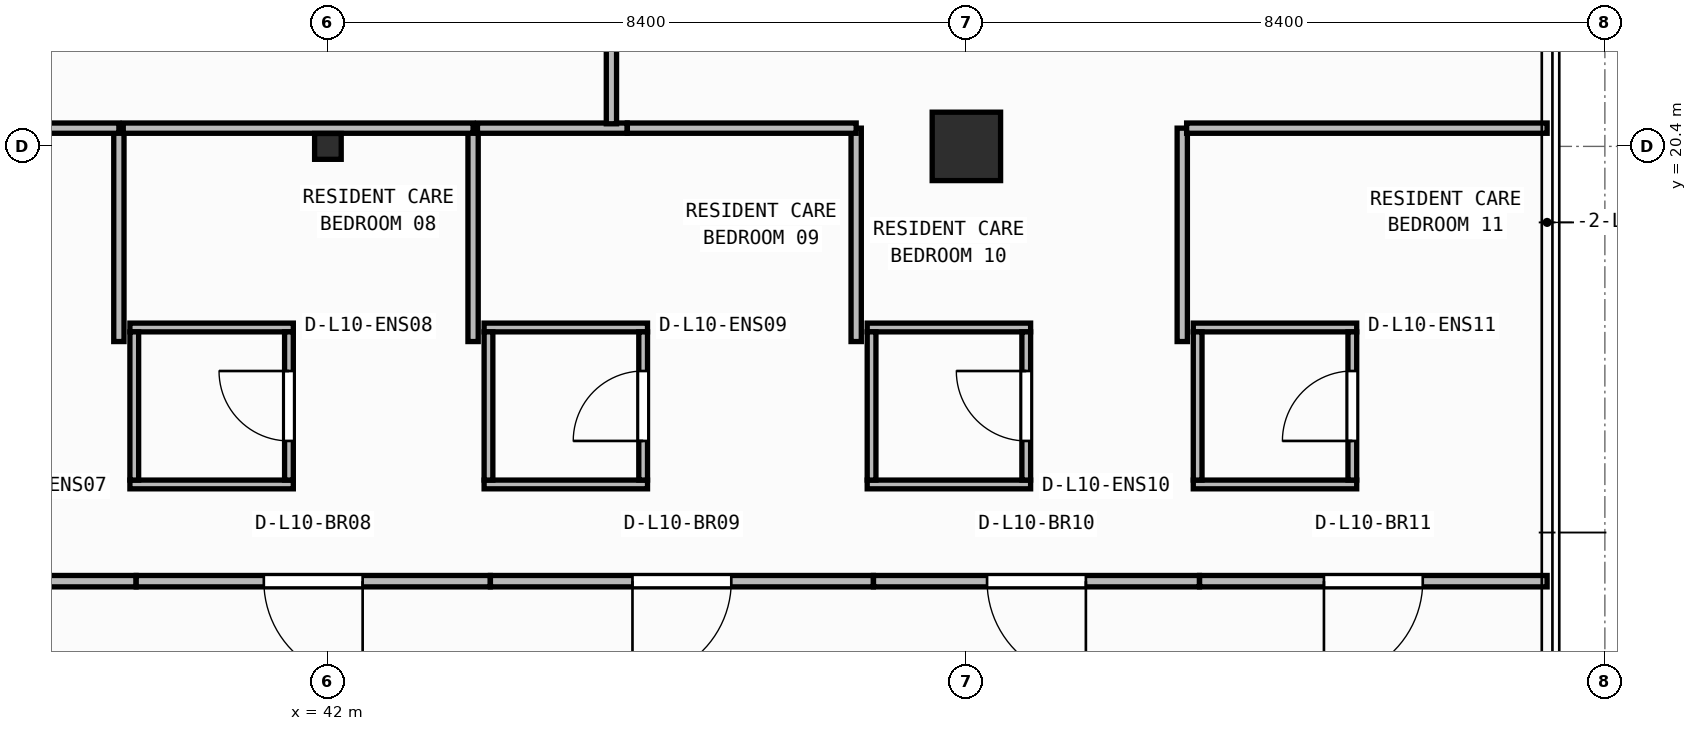
"""IFC4 building model, lengths in metres.
Left out: names, types, materials, properties, quantities, classifications, styles, units other than length and angle.
Written with IfcOpenShell. Run it as: python <this file> out.ifc"""

import sys

from ifc_helpers import new_model, si_unit, direction, frame, frame_2d, origin, origin_2d, place, context, subcontext, project, spatial, rectangle, i_section, extrude, element, fill, save


model = new_model("IFC4")
c1 = context("Model", 3, precision=1e-05, world=origin(), true_north=direction((0.0, 1.0)))
c2 = subcontext(c1, "Body", "Model", "MODEL_VIEW")
j1 = project(units=[si_unit("LENGTHUNIT", "METRE"), si_unit("PLANEANGLEUNIT", "RADIAN")], contexts=[c1])
p1 = place(None, origin())
s1 = spatial("IfcSite", under=j1, at=p1, CompositionType="ELEMENT")
p2 = place(p1, origin())
s2 = spatial("IfcBuilding", under=s1, at=p2, CompositionType="ELEMENT")
p3 = place(p2, frame((0.0, 0.0, 42.25)))
s3 = spatial("IfcBuildingStorey", under=s2, at=p3, CompositionType="ELEMENT", Elevation=42.25)
p4 = place(p3, frame((42.0, 20.4, 0.0), z_axis=(0.0, 0.0, 1.0), x_axis=(1.0, 0.0, 0.0)))
e1 = element("IfcColumn", 1, at=p4, inside=s3, PredefinedType="COLUMN", context=c2, shape_type="SweptSolid", body=[
    extrude(i_section(OverallWidth=0.35, OverallDepth=0.34, WebThickness=0.016, FlangeThickness=0.028, at=origin_2d()), origin(), (0.0, 0.0, 1.0), 3.95),
])
p5 = place(p3, frame((50.4, 20.4, 0.0), z_axis=(0.0, 0.0, 1.0), x_axis=(1.0, 0.0, 0.0)))
e2 = element("IfcColumn", 2, at=p5, inside=s3, PredefinedType="COLUMN", context=c2, shape_type="SweptSolid", body=[
    extrude(rectangle(XDim=0.9, YDim=0.9, at=origin_2d()), origin(), (0.0, 0.0, 1.0), 3.95),
])
p6 = place(p3, frame((39.395, 15.952, 0.0), z_axis=(0.0, 0.0, 1.0), x_axis=(1.0, 0.0, 0.0)))
e3 = element("IfcWall", 3, at=p6, inside=s3, PredefinedType="PARTITIONING", context=c2, shape_type="SweptSolid", body=[
    extrude(rectangle(XDim=2.15, YDim=0.115, at=frame_2d((1.075, 0.0))), origin(), (0.0, 0.0, 1.0), 3.381),
])
p7 = place(p3, frame((39.395, 18.018, 0.0), z_axis=(0.0, 0.0, 1.0), x_axis=(1.0, 0.0, 0.0)))
e4 = element("IfcWall", 4, at=p7, inside=s3, PredefinedType="PARTITIONING", context=c2, shape_type="SweptSolid", body=[
    extrude(rectangle(XDim=2.15, YDim=0.115, at=frame_2d((1.075, 0.0))), origin(), (0.0, 0.0, 1.0), 3.71),
])
p8 = place(p3, frame((39.452, 16.01, 0.0), z_axis=(0.0, 0.0, 1.0), x_axis=(0.0, 1.0, 0.0)))
e5 = element("IfcWall", 5, at=p8, inside=s3, PredefinedType="PARTITIONING", context=c2, shape_type="SweptSolid", body=[
    extrude(rectangle(XDim=1.95, YDim=0.115, at=frame_2d((0.975, 0.0))), origin(), (0.0, 0.0, 1.0), 3.71),
])
p9 = place(p3, frame((41.488, 16.01, 0.0), z_axis=(0.0, 0.0, 1.0), x_axis=(0.0, 1.0, 0.0)))
e6 = element("IfcWall", 6, at=p9, inside=s3, PredefinedType="PARTITIONING", context=c2, shape_type="SweptSolid", body=[
    extrude(rectangle(XDim=1.95, YDim=0.115, at=frame_2d((0.975, 0.0))), origin(), (0.0, 0.0, 1.0), 3.71),
])
p10 = place(p9, frame((0.515, 0.0, 0.0)))
e7 = element("IfcOpeningElement", 7, at=p10, cuts=e6, PredefinedType="OPENING", context=c2, shape_type="SweptSolid", body=[
    extrude(rectangle(XDim=0.92, YDim=2.1, at=frame_2d((0.46, 1.05))), frame((0.0, 0.067, 0.0), z_axis=(0.0, -1.0, 0.0), x_axis=(1.0, 0.0, 0.0)), (0.0, 0.0, 1.0), 0.135),
])
p11 = place(p3, frame((44.055, 15.952, 0.0), z_axis=(0.0, 0.0, 1.0), x_axis=(1.0, 0.0, 0.0)))
e8 = element("IfcWall", 8, at=p11, inside=s3, PredefinedType="PARTITIONING", context=c2, shape_type="SweptSolid", body=[
    extrude(rectangle(XDim=2.15, YDim=0.115, at=frame_2d((1.075, 0.0))), origin(), (0.0, 0.0, 1.0), 3.381),
])
p12 = place(p3, frame((44.055, 18.018, 0.0), z_axis=(0.0, 0.0, 1.0), x_axis=(1.0, 0.0, 0.0)))
e9 = element("IfcWall", 9, at=p12, inside=s3, PredefinedType="PARTITIONING", context=c2, shape_type="SweptSolid", body=[
    extrude(rectangle(XDim=2.15, YDim=0.115, at=frame_2d((1.075, 0.0))), origin(), (0.0, 0.0, 1.0), 3.71),
])
p13 = place(p3, frame((44.113, 16.01, 0.0), z_axis=(0.0, 0.0, 1.0), x_axis=(0.0, 1.0, 0.0)))
e10 = element("IfcWall", 10, at=p13, inside=s3, PredefinedType="PARTITIONING", context=c2, shape_type="SweptSolid", body=[
    extrude(rectangle(XDim=1.95, YDim=0.115, at=frame_2d((0.975, 0.0))), origin(), (0.0, 0.0, 1.0), 3.71),
])
p14 = place(p3, frame((46.147, 16.01, 0.0), z_axis=(0.0, 0.0, 1.0), x_axis=(0.0, 1.0, 0.0)))
e11 = element("IfcWall", 11, at=p14, inside=s3, PredefinedType="PARTITIONING", context=c2, shape_type="SweptSolid", body=[
    extrude(rectangle(XDim=1.95, YDim=0.115, at=frame_2d((0.975, 0.0))), origin(), (0.0, 0.0, 1.0), 3.71),
])
p15 = place(p14, frame((0.515, 0.0, 0.0)))
e12 = element("IfcOpeningElement", 12, at=p15, cuts=e11, PredefinedType="OPENING", context=c2, shape_type="SweptSolid", body=[
    extrude(rectangle(XDim=0.92, YDim=2.1, at=frame_2d((0.46, 1.05))), frame((0.0, 0.067, 0.0), z_axis=(0.0, -1.0, 0.0), x_axis=(1.0, 0.0, 0.0)), (0.0, 0.0, 1.0), 0.135),
])
p16 = place(p3, frame((49.095, 15.952, 0.0), z_axis=(0.0, 0.0, 1.0), x_axis=(1.0, 0.0, 0.0)))
e13 = element("IfcWall", 13, at=p16, inside=s3, PredefinedType="PARTITIONING", context=c2, shape_type="SweptSolid", body=[
    extrude(rectangle(XDim=2.15, YDim=0.115, at=frame_2d((1.075, 0.0))), origin(), (0.0, 0.0, 1.0), 3.381),
])
p17 = place(p3, frame((49.095, 18.018, 0.0), z_axis=(0.0, 0.0, 1.0), x_axis=(1.0, 0.0, 0.0)))
e14 = element("IfcWall", 14, at=p17, inside=s3, PredefinedType="PARTITIONING", context=c2, shape_type="SweptSolid", body=[
    extrude(rectangle(XDim=2.15, YDim=0.115, at=frame_2d((1.075, 0.0))), origin(), (0.0, 0.0, 1.0), 3.71),
])
p18 = place(p3, frame((49.153, 16.01, 0.0), z_axis=(0.0, 0.0, 1.0), x_axis=(0.0, 1.0, 0.0)))
e15 = element("IfcWall", 15, at=p18, inside=s3, PredefinedType="PARTITIONING", context=c2, shape_type="SweptSolid", body=[
    extrude(rectangle(XDim=1.95, YDim=0.115, at=frame_2d((0.975, 0.0))), origin(), (0.0, 0.0, 1.0), 3.71),
])
p19 = place(p3, frame((51.188, 16.01, 0.0), z_axis=(0.0, 0.0, 1.0), x_axis=(0.0, 1.0, 0.0)))
e16 = element("IfcWall", 16, at=p19, inside=s3, PredefinedType="PARTITIONING", context=c2, shape_type="SweptSolid", body=[
    extrude(rectangle(XDim=1.95, YDim=0.115, at=frame_2d((0.975, 0.0))), origin(), (0.0, 0.0, 1.0), 3.71),
])
p20 = place(p19, frame((0.515, 0.0, 0.0)))
e17 = element("IfcOpeningElement", 17, at=p20, cuts=e16, PredefinedType="OPENING", context=c2, shape_type="SweptSolid", body=[
    extrude(rectangle(XDim=0.92, YDim=2.1, at=frame_2d((0.46, 1.05))), frame((0.0, 0.067, 0.0), z_axis=(0.0, -1.0, 0.0), x_axis=(1.0, 0.0, 0.0)), (0.0, 0.0, 1.0), 0.135),
])
for number, where, z_axis, x_axis in (
    (18, (53.385, 15.952, 0.0), (0.0, 0.0, 1.0), (1.0, 0.0, 0.0)),
    (19, (53.385, 18.018, 0.0), (0.0, 0.0, 1.0), (1.0, 0.0, 0.0)),
):
    element("IfcWall", number, at=place(p3, frame(where, z_axis=z_axis, x_axis=x_axis)), inside=s3, PredefinedType="PARTITIONING", context=c2, shape_type="SweptSolid", body=[
        extrude(rectangle(XDim=2.15, YDim=0.115, at=frame_2d((1.075, 0.0))), origin(), (0.0, 0.0, 1.0), 3.71),
    ])
p21 = place(p3, frame((53.442, 16.01, 0.0), z_axis=(0.0, 0.0, 1.0), x_axis=(0.0, 1.0, 0.0)))
e20 = element("IfcWall", 20, at=p21, inside=s3, PredefinedType="PARTITIONING", context=c2, shape_type="SweptSolid", body=[
    extrude(rectangle(XDim=1.95, YDim=0.115, at=frame_2d((0.975, 0.0))), origin(), (0.0, 0.0, 1.0), 3.71),
])
p22 = place(p3, frame((55.478, 16.01, 0.0), z_axis=(0.0, 0.0, 1.0), x_axis=(0.0, 1.0, 0.0)))
e21 = element("IfcWall", 21, at=p22, inside=s3, PredefinedType="PARTITIONING", context=c2, shape_type="SweptSolid", body=[
    extrude(rectangle(XDim=1.95, YDim=0.115, at=frame_2d((0.975, 0.0))), origin(), (0.0, 0.0, 1.0), 3.71),
])
p23 = place(p22, frame((0.515, 0.0, 0.0)))
e22 = element("IfcOpeningElement", 22, at=p23, cuts=e21, PredefinedType="OPENING", context=c2, shape_type="SweptSolid", body=[
    extrude(rectangle(XDim=0.92, YDim=2.1, at=frame_2d((0.46, 1.05))), frame((0.0, 0.067, 0.0), z_axis=(0.0, -1.0, 0.0), x_axis=(1.0, 0.0, 0.0)), (0.0, 0.0, 1.0), 0.135),
])
p24 = place(p3, frame((39.476, 14.68, 0.0), z_axis=(0.0, 0.0, 1.0), x_axis=(-1.0, 0.0, 0.0)))
e23 = element("IfcWall", 23, at=p24, inside=s3, PredefinedType="PARTITIONING", context=c2, shape_type="SweptSolid", body=[
    extrude(rectangle(XDim=4.288, YDim=0.15, at=frame_2d((2.144, 0.0))), origin(), (0.0, 0.0, 1.0), 3.71),
])
p25 = place(p24, frame((1.494, 0.0, 0.0)))
e24 = element("IfcOpeningElement", 24, at=p25, cuts=e23, PredefinedType="OPENING", context=c2, shape_type="SweptSolid", body=[
    extrude(rectangle(XDim=1.3, YDim=2.15, at=frame_2d((0.65, 1.075))), frame((0.0, 0.085, 0.0), z_axis=(0.0, -1.0, 0.0), x_axis=(1.0, 0.0, 0.0)), (0.0, 0.0, 1.0), 0.17),
])
p26 = place(p3, frame((44.136, 14.68, 0.0), z_axis=(0.0, 0.0, 1.0), x_axis=(-1.0, 0.0, 0.0)))
e25 = element("IfcWall", 25, at=p26, inside=s3, PredefinedType="PARTITIONING", context=c2, shape_type="SweptSolid", body=[
    extrude(rectangle(XDim=4.658, YDim=0.15, at=frame_2d((2.329, 0.0))), origin(), (0.0, 0.0, 1.0), 3.71),
])
p27 = place(p26, frame((1.679, 0.0, 0.0)))
e26 = element("IfcOpeningElement", 26, at=p27, cuts=e25, PredefinedType="OPENING", context=c2, shape_type="SweptSolid", body=[
    extrude(rectangle(XDim=1.3, YDim=2.15, at=frame_2d((0.65, 1.075))), frame((0.0, 0.085, 0.0), z_axis=(0.0, -1.0, 0.0), x_axis=(1.0, 0.0, 0.0)), (0.0, 0.0, 1.0), 0.17),
])
p28 = place(p3, frame((49.176, 14.68, 0.0), z_axis=(0.0, 0.0, 1.0), x_axis=(-1.0, 0.0, 0.0)))
e27 = element("IfcWall", 27, at=p28, inside=s3, PredefinedType="PARTITIONING", context=c2, shape_type="SweptSolid", body=[
    extrude(rectangle(XDim=5.038, YDim=0.15, at=frame_2d((2.519, 0.0))), origin(), (0.0, 0.0, 1.0), 3.71),
])
p29 = place(p28, frame((1.869, 0.0, 0.0)))
e28 = element("IfcOpeningElement", 28, at=p29, cuts=e27, PredefinedType="OPENING", context=c2, shape_type="SweptSolid", body=[
    extrude(rectangle(XDim=1.3, YDim=2.15, at=frame_2d((0.65, 1.075))), frame((0.0, 0.085, 0.0), z_axis=(0.0, -1.0, 0.0), x_axis=(1.0, 0.0, 0.0)), (0.0, 0.0, 1.0), 0.17),
])
p30 = place(p3, frame((53.466, 14.68, 0.0), z_axis=(0.0, 0.0, 1.0), x_axis=(-1.0, 0.0, 0.0)))
e29 = element("IfcWall", 29, at=p30, inside=s3, PredefinedType="PARTITIONING", context=c2, shape_type="SweptSolid", body=[
    extrude(rectangle(XDim=4.288, YDim=0.15, at=frame_2d((2.144, 0.0))), origin(), (0.0, 0.0, 1.0), 3.71),
])
p31 = place(p30, frame((1.494, 0.0, 0.0)))
e30 = element("IfcOpeningElement", 30, at=p31, cuts=e29, PredefinedType="OPENING", context=c2, shape_type="SweptSolid", body=[
    extrude(rectangle(XDim=1.3, YDim=2.15, at=frame_2d((0.65, 1.075))), frame((0.0, 0.085, 0.0), z_axis=(0.0, -1.0, 0.0), x_axis=(1.0, 0.0, 0.0)), (0.0, 0.0, 1.0), 0.17),
])
p32 = place(p3, frame((58.04, 14.68, 0.0), z_axis=(0.0, 0.0, 1.0), x_axis=(-1.0, 0.0, 0.0)))
e31 = element("IfcWall", 31, at=p32, inside=s3, PredefinedType="PARTITIONING", context=c2, shape_type="SweptSolid", body=[
    extrude(rectangle(XDim=4.572, YDim=0.15, at=frame_2d((2.286, 0.0))), origin(), (0.0, 0.0, 1.0), 3.71),
])
p33 = place(p32, frame((1.636, 0.0, 0.0)))
e32 = element("IfcOpeningElement", 32, at=p33, cuts=e31, PredefinedType="OPENING", context=c2, shape_type="SweptSolid", body=[
    extrude(rectangle(XDim=1.3, YDim=2.15, at=frame_2d((0.65, 1.075))), frame((0.0, 0.085, 0.0), z_axis=(0.0, -1.0, 0.0), x_axis=(1.0, 0.0, 0.0)), (0.0, 0.0, 1.0), 0.17),
])
p34 = place(p3, frame((39.25, 17.833, 0.0), z_axis=(0.0, 0.0, 1.0), x_axis=(0.0, 1.0, 0.0)))
e33 = element("IfcWall", 33, at=p34, inside=s3, PredefinedType="PARTITIONING", context=c2, shape_type="SweptSolid", body=[
    extrude(rectangle(XDim=2.807, YDim=0.135, at=frame_2d((1.404, 0.0))), origin(), (0.0, 0.0, 1.0), 3.71),
])
p35 = place(p3, frame((39.25, 20.64, 0.0), z_axis=(0.0, 0.0, 1.0), x_axis=(-1.0, 0.0, 0.0)))
e34 = element("IfcWall", 34, at=p35, inside=s3, PredefinedType="PARTITIONING", context=c2, shape_type="SweptSolid", body=[
    extrude(rectangle(XDim=2.72, YDim=0.135, at=frame_2d((1.36, 0.0))), origin(), (0.0, 0.0, 1.0), 3.073),
])
p36 = place(p3, frame((43.91, 17.833, 0.0), z_axis=(0.0, 0.0, 1.0), x_axis=(0.0, 1.0, 0.0)))
e35 = element("IfcWall", 35, at=p36, inside=s3, PredefinedType="PARTITIONING", context=c2, shape_type="SweptSolid", body=[
    extrude(rectangle(XDim=2.807, YDim=0.135, at=frame_2d((1.404, 0.0))), origin(), (0.0, 0.0, 1.0), 3.71),
])
p37 = place(p3, frame((43.91, 20.64, 0.0), z_axis=(0.0, 0.0, 1.0), x_axis=(-1.0, 0.0, 0.0)))
e36 = element("IfcWall", 36, at=p37, inside=s3, PredefinedType="PARTITIONING", context=c2, shape_type="SweptSolid", body=[
    extrude(rectangle(XDim=4.602, YDim=0.135, at=frame_2d((2.301, 0.0))), origin(), (0.0, 0.0, 1.0), 3.073),
])
p38 = place(p3, frame((48.95, 17.833, 0.0), z_axis=(0.0, 0.0, 1.0), x_axis=(0.0, 1.0, 0.0)))
e37 = element("IfcWall", 37, at=p38, inside=s3, PredefinedType="PARTITIONING", context=c2, shape_type="SweptSolid", body=[
    extrude(rectangle(XDim=2.807, YDim=0.135, at=frame_2d((1.404, 0.0))), origin(), (0.0, 0.0, 1.0), 3.71),
])
p39 = place(p3, frame((45.938, 20.64, 0.0), z_axis=(0.0, 0.0, 1.0), x_axis=(-1.0, 0.0, 0.0)))
e38 = element("IfcWall", 38, at=p39, inside=s3, PredefinedType="PARTITIONING", context=c2, shape_type="SweptSolid", body=[
    extrude(rectangle(XDim=1.97, YDim=0.135, at=frame_2d((0.985, 0.0))), origin(), (0.0, 0.0, 1.0), 3.073),
])
p40 = place(p3, frame((48.95, 20.64, 0.0), z_axis=(0.0, 0.0, 1.0), x_axis=(-1.0, 0.0, 0.0)))
e39 = element("IfcWall", 39, at=p40, inside=s3, PredefinedType="PARTITIONING", context=c2, shape_type="SweptSolid", body=[
    extrude(rectangle(XDim=3.01, YDim=0.135, at=frame_2d((1.505, 0.0))), origin(), (0.0, 0.0, 1.0), 3.073),
])
p41 = place(p3, frame((53.24, 17.833, 0.0), z_axis=(0.0, 0.0, 1.0), x_axis=(0.0, 1.0, 0.0)))
e40 = element("IfcWall", 40, at=p41, inside=s3, PredefinedType="PARTITIONING", context=c2, shape_type="SweptSolid", body=[
    extrude(rectangle(XDim=2.807, YDim=0.135, at=frame_2d((1.404, 0.0))), origin(), (0.0, 0.0, 1.0), 3.71),
])
p42 = place(p3, frame((58.04, 20.64, 0.0), z_axis=(0.0, 0.0, 1.0), x_axis=(-1.0, 0.0, 0.0)))
e41 = element("IfcWall", 41, at=p42, inside=s3, PredefinedType="PARTITIONING", context=c2, shape_type="SweptSolid", body=[
    extrude(rectangle(XDim=4.742, YDim=0.135, at=frame_2d((2.371, 0.0))), origin(), (0.0, 0.0, 1.0), 3.71),
])
p43 = place(p3, frame((45.73, 20.698, 0.0), z_axis=(0.0, 0.0, 1.0), x_axis=(0.0, 1.0, 0.0)))
e42 = element("IfcWall", 42, at=p43, inside=s3, PredefinedType="PARTITIONING", context=c2, shape_type="SweptSolid", body=[
    extrude(rectangle(XDim=11.756, YDim=0.135, at=frame_2d((5.878, 0.0))), origin(), (0.0, 0.0, 1.0), 3.71),
])
p44 = place(p43, frame((5.328, 0.0, 0.0)))
e43 = element("IfcOpeningElement", 43, at=p44, cuts=e42, PredefinedType="OPENING", context=c2, shape_type="SweptSolid", body=[
    extrude(rectangle(XDim=1.1, YDim=2.1, at=frame_2d((0.55, 1.05))), frame((0.0, 0.077, 0.0), z_axis=(0.0, -1.0, 0.0), x_axis=(1.0, 0.0, 0.0)), (0.0, 0.0, 1.0), 0.155),
])
p45 = place(p10, origin())
e44 = element("IfcDoor", 44, at=p45, inside=s3, OperationType="SINGLE_SWING_RIGHT", PredefinedType="DOOR", context=c2, shape_type="SweptSolid", body=[
    extrude(rectangle(XDim=0.92, YDim=2.1, at=frame_2d((0.46, 1.05))), frame((0.0, 0.025, 0.0), z_axis=(0.0, -1.0, 0.0), x_axis=(1.0, 0.0, 0.0)), (0.0, 0.0, 1.0), 0.05),
])
fill(e7, e44)
p46 = place(p15, origin())
e45 = element("IfcDoor", 45, at=p46, inside=s3, OperationType="SINGLE_SWING_LEFT", PredefinedType="DOOR", context=c2, shape_type="SweptSolid", body=[
    extrude(rectangle(XDim=0.92, YDim=2.1, at=frame_2d((0.46, 1.05))), frame((0.0, 0.025, 0.0), z_axis=(0.0, -1.0, 0.0), x_axis=(1.0, 0.0, 0.0)), (0.0, 0.0, 1.0), 0.05),
])
fill(e12, e45)
p47 = place(p20, origin())
e46 = element("IfcDoor", 46, at=p47, inside=s3, OperationType="SINGLE_SWING_RIGHT", PredefinedType="DOOR", context=c2, shape_type="SweptSolid", body=[
    extrude(rectangle(XDim=0.92, YDim=2.1, at=frame_2d((0.46, 1.05))), frame((0.0, 0.025, 0.0), z_axis=(0.0, -1.0, 0.0), x_axis=(1.0, 0.0, 0.0)), (0.0, 0.0, 1.0), 0.05),
])
fill(e17, e46)
p48 = place(p23, origin())
e47 = element("IfcDoor", 47, at=p48, inside=s3, OperationType="SINGLE_SWING_LEFT", PredefinedType="DOOR", context=c2, shape_type="SweptSolid", body=[
    extrude(rectangle(XDim=0.92, YDim=2.1, at=frame_2d((0.46, 1.05))), frame((0.0, 0.025, 0.0), z_axis=(0.0, -1.0, 0.0), x_axis=(1.0, 0.0, 0.0)), (0.0, 0.0, 1.0), 0.05),
])
fill(e22, e47)
p49 = place(p27, origin())
e48 = element("IfcDoor", 48, at=p49, inside=s3, OperationType="SINGLE_SWING_LEFT", PredefinedType="DOOR", context=c2, shape_type="SweptSolid", body=[
    extrude(rectangle(XDim=1.3, YDim=2.15, at=frame_2d((0.65, 1.075))), frame((0.0, 0.025, 0.0), z_axis=(0.0, -1.0, 0.0), x_axis=(1.0, 0.0, 0.0)), (0.0, 0.0, 1.0), 0.05),
])
fill(e26, e48)
p50 = place(p29, origin())
e49 = element("IfcDoor", 49, at=p50, inside=s3, OperationType="SINGLE_SWING_RIGHT", PredefinedType="DOOR", context=c2, shape_type="SweptSolid", body=[
    extrude(rectangle(XDim=1.3, YDim=2.15, at=frame_2d((0.65, 1.075))), frame((0.0, 0.025, 0.0), z_axis=(0.0, -1.0, 0.0), x_axis=(1.0, 0.0, 0.0)), (0.0, 0.0, 1.0), 0.05),
])
fill(e28, e49)
p51 = place(p31, origin())
e50 = element("IfcDoor", 50, at=p51, inside=s3, OperationType="SINGLE_SWING_LEFT", PredefinedType="DOOR", context=c2, shape_type="SweptSolid", body=[
    extrude(rectangle(XDim=1.3, YDim=2.15, at=frame_2d((0.65, 1.075))), frame((0.0, 0.025, 0.0), z_axis=(0.0, -1.0, 0.0), x_axis=(1.0, 0.0, 0.0)), (0.0, 0.0, 1.0), 0.05),
])
fill(e30, e50)
p52 = place(p33, origin())
e51 = element("IfcDoor", 51, at=p52, inside=s3, OperationType="SINGLE_SWING_RIGHT", PredefinedType="DOOR", context=c2, shape_type="SweptSolid", body=[
    extrude(rectangle(XDim=1.3, YDim=2.15, at=frame_2d((0.65, 1.075))), frame((0.0, 0.025, 0.0), z_axis=(0.0, -1.0, 0.0), x_axis=(1.0, 0.0, 0.0)), (0.0, 0.0, 1.0), 0.05),
])
fill(e32, e51)
save(model, sys.argv[1])
